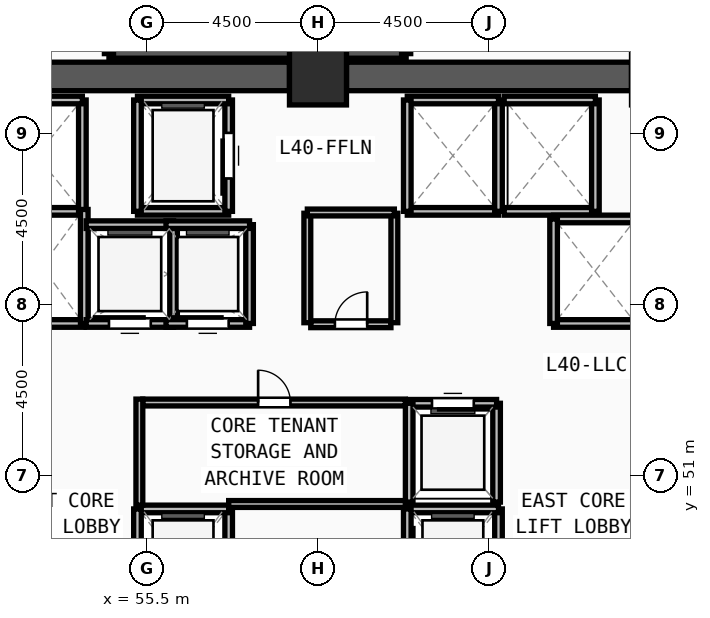
"""IFC4 building model, lengths in metres.
Left out: names, types, materials, properties, quantities, classifications, styles, units other than length and angle.
Written with IfcOpenShell. Run it as: python <this file> out.ifc"""

import sys

from ifc_helpers import new_model, si_unit, direction, frame, frame_2d, origin, origin_2d, place, context, subcontext, project, spatial, rectangle, extrude, source, transform, mapped, element, fill, save


model = new_model("IFC4")
c1 = context("Model", 3, precision=1e-05, world=origin(), true_north=direction((0.0, 1.0)))
c2 = subcontext(c1, "Body", "Model", "MODEL_VIEW")
j1 = project(units=[si_unit("LENGTHUNIT", "METRE"), si_unit("PLANEANGLEUNIT", "RADIAN")], contexts=[c1])
p1 = place(None, origin())
s1 = spatial("IfcSite", under=j1, at=p1, CompositionType="ELEMENT")
p2 = place(p1, origin())
s2 = spatial("IfcBuilding", under=s1, at=p2, CompositionType="ELEMENT")
p3 = place(p2, frame((0.0, 0.0, 155.25)))
s3 = spatial("IfcBuildingStorey", under=s2, at=p3, CompositionType="ELEMENT", Elevation=155.25)
m1 = source(origin(), c2, "Body", "SweptSolid", [
    extrude(rectangle(XDim=1.5, YDim=1.5, at=origin_2d()), origin(), (0.0, 0.0, 1.0), 3.75),
])
p4 = place(p3, frame((60.0, 61.5, 0.0), z_axis=(0.0, 0.0, 1.0), x_axis=(1.0, 0.0, 0.0)))
e1 = element("IfcColumn", 1, at=p4, inside=s3, PredefinedType="COLUMN", context=c2, shape_type="MappedRepresentation", body=[
    mapped(m1, transform((0.0, 0.0, 0.0), x_axis=(1.0, 0.0, 0.0), y_axis=(0.0, 1.0, 0.0), z_axis=(0.0, 0.0, 1.0), scale=1.0)),
])
for number, where, z_axis, x_axis in (
    (2, (51.75, 61.5, 0.0), (0.0, 0.0, 1.0), (1.0, 0.0, 0.0)),
    (3, (60.75, 61.5, 0.0), (0.0, 0.0, 1.0), (1.0, 0.0, 0.0)),
):
    element("IfcWall", number, at=place(p3, frame(where, z_axis=z_axis, x_axis=x_axis)), inside=s3, PredefinedType="SHEAR", context=c2, shape_type="SweptSolid", body=[
        extrude(rectangle(XDim=7.5, YDim=0.75, at=frame_2d((3.75, 0.0))), origin(), (0.0, 0.0, 1.0), 3.57),
    ])
p5 = place(p3, frame((54.5, 62.1, 0.0), z_axis=(0.0, 0.0, 1.0), x_axis=(1.0, 0.0, 0.0)))
e4 = element("IfcWall", 4, at=p5, inside=s3, PredefinedType="SOLIDWALL", context=c2, shape_type="SweptSolid", body=[
    extrude(rectangle(XDim=7.82, YDim=0.24, at=frame_2d((3.91, 0.0))), origin(), (0.0, 0.0, 1.0), 3.57),
])
for number, where, z_axis, x_axis in (
    (5, (62.32, 62.1, 0.0), (0.0, 0.0, 1.0), (0.0, 1.0, 0.0)),
    (6, (54.5, 65.54, 0.0), (0.0, 0.0, 1.0), (0.0, -1.0, 0.0)),
):
    element("IfcWall", number, at=place(p3, frame(where, z_axis=z_axis, x_axis=x_axis)), inside=s3, PredefinedType="SOLIDWALL", context=c2, shape_type="SweptSolid", body=[
        extrude(rectangle(XDim=3.44, YDim=0.24, at=frame_2d((1.72, 0.0))), origin(), (0.0, 0.0, 1.0), 3.57),
    ])
p6 = place(p3, frame((57.65, 47.12, 0.0), z_axis=(0.0, 0.0, 1.0), x_axis=(0.0, 1.0, 0.0)))
e7 = element("IfcWall", 7, at=p6, inside=s3, PredefinedType="SOLIDWALL", context=c2, shape_type="SweptSolid", body=[
    extrude(rectangle(XDim=3.0, YDim=0.2, at=frame_2d((1.5, 0.0))), origin(), (0.0, 0.0, 1.0), 3.57),
])
m2 = source(origin(), c2, "Body", "SweptSolid", [
    extrude(rectangle(XDim=1.2, YDim=2.3, at=frame_2d((0.6, 1.15))), frame((0.0, 0.11, 0.0), z_axis=(0.0, -1.0, 0.0), x_axis=(1.0, 0.0, 0.0)), (0.0, 0.0, 1.0), 0.22),
])
p7 = place(p6, frame((0.9, 0.0, 0.0)))
e8 = element("IfcOpeningElement", 8, at=p7, cuts=e7, PredefinedType="OPENING", context=c2, shape_type="MappedRepresentation", body=[
    mapped(m2, transform((0.0, 0.0, 0.0), x_axis=(1.0, 0.0, 0.0), y_axis=(0.0, 1.0, 0.0), z_axis=(0.0, 0.0, 1.0), scale=1.0)),
])
p8 = place(p3, frame((57.65, 50.12, 0.0), z_axis=(0.0, 0.0, 1.0), x_axis=(-1.0, 0.0, 0.0)))
e9 = element("IfcWall", 9, at=p8, inside=s3, PredefinedType="SOLIDWALL", context=c2, shape_type="SweptSolid", body=[
    extrude(rectangle(XDim=2.4, YDim=0.2, at=frame_2d((1.2, 0.0))), origin(), (0.0, 0.0, 1.0), 3.57),
])
for number, where, z_axis, x_axis in (
    (10, (55.25, 50.12, 0.0), (0.0, 0.0, 1.0), (0.0, -1.0, 0.0)),
    (11, (64.75, 47.12, 0.0), (0.0, 0.0, 1.0), (0.0, 1.0, 0.0)),
):
    element("IfcWall", number, at=place(p3, frame(where, z_axis=z_axis, x_axis=x_axis)), inside=s3, PredefinedType="SOLIDWALL", context=c2, shape_type="SweptSolid", body=[
        extrude(rectangle(XDim=3.0, YDim=0.2, at=frame_2d((1.5, 0.0))), origin(), (0.0, 0.0, 1.0), 3.57),
    ])
p9 = place(p3, frame((64.75, 50.12, 0.0), z_axis=(0.0, 0.0, 1.0), x_axis=(-1.0, 0.0, 0.0)))
e12 = element("IfcWall", 12, at=p9, inside=s3, PredefinedType="SOLIDWALL", context=c2, shape_type="SweptSolid", body=[
    extrude(rectangle(XDim=2.4, YDim=0.2, at=frame_2d((1.2, 0.0))), origin(), (0.0, 0.0, 1.0), 3.57),
])
p10 = place(p3, frame((62.35, 50.12, 0.0), z_axis=(0.0, 0.0, 1.0), x_axis=(0.0, -1.0, 0.0)))
e13 = element("IfcWall", 13, at=p10, inside=s3, PredefinedType="SOLIDWALL", context=c2, shape_type="SweptSolid", body=[
    extrude(rectangle(XDim=3.0, YDim=0.2, at=frame_2d((1.5, 0.0))), origin(), (0.0, 0.0, 1.0), 3.57),
])
p11 = place(p10, frame((0.9, 0.0, 0.0)))
e14 = element("IfcOpeningElement", 14, at=p11, cuts=e13, PredefinedType="OPENING", context=c2, shape_type="MappedRepresentation", body=[
    mapped(m2, transform((0.0, 0.0, 0.0), x_axis=(1.0, 0.0, 0.0), y_axis=(0.0, 1.0, 0.0), z_axis=(0.0, 0.0, 1.0), scale=1.0)),
])
p12 = place(p3, frame((55.25, 57.95, 0.0), z_axis=(0.0, 0.0, 1.0), x_axis=(1.0, 0.0, 0.0)))
e15 = element("IfcWall", 15, at=p12, inside=s3, PredefinedType="SOLIDWALL", context=c2, shape_type="SweptSolid", body=[
    extrude(rectangle(XDim=2.4, YDim=0.2, at=frame_2d((1.2, 0.0))), origin(), (0.0, 0.0, 1.0), 3.57),
])
p13 = place(p3, frame((57.65, 57.95, 0.0), z_axis=(0.0, 0.0, 1.0), x_axis=(0.0, 1.0, 0.0)))
e16 = element("IfcWall", 16, at=p13, inside=s3, PredefinedType="SOLIDWALL", context=c2, shape_type="SweptSolid", body=[
    extrude(rectangle(XDim=2.93, YDim=0.2, at=frame_2d((1.465, 0.0))), origin(), (0.0, 0.0, 1.0), 3.57),
])
p14 = place(p13, frame((0.865, 0.0, 0.0)))
e17 = element("IfcOpeningElement", 17, at=p14, cuts=e16, PredefinedType="OPENING", context=c2, shape_type="MappedRepresentation", body=[
    mapped(m2, transform((0.0, 0.0, 0.0), x_axis=(1.0, 0.0, 0.0), y_axis=(0.0, 1.0, 0.0), z_axis=(0.0, 0.0, 1.0), scale=1.0)),
])
p15 = place(p3, frame((57.65, 60.88, 0.0), z_axis=(0.0, 0.0, 1.0), x_axis=(-1.0, 0.0, 0.0)))
e18 = element("IfcWall", 18, at=p15, inside=s3, PredefinedType="SOLIDWALL", context=c2, shape_type="SweptSolid", body=[
    extrude(rectangle(XDim=2.4, YDim=0.2, at=frame_2d((1.2, 0.0))), origin(), (0.0, 0.0, 1.0), 3.57),
])
p16 = place(p3, frame((55.25, 60.88, 0.0), z_axis=(0.0, 0.0, 1.0), x_axis=(0.0, -1.0, 0.0)))
e19 = element("IfcWall", 19, at=p16, inside=s3, PredefinedType="SOLIDWALL", context=c2, shape_type="SweptSolid", body=[
    extrude(rectangle(XDim=2.93, YDim=0.2, at=frame_2d((1.465, 0.0))), origin(), (0.0, 0.0, 1.0), 3.57),
])
p17 = place(p3, frame((62.35, 57.95, 0.0), z_axis=(0.0, 0.0, 1.0), x_axis=(1.0, 0.0, 0.0)))
e20 = element("IfcWall", 20, at=p17, inside=s3, PredefinedType="SOLIDWALL", context=c2, shape_type="SweptSolid", body=[
    extrude(rectangle(XDim=2.4, YDim=0.2, at=frame_2d((1.2, 0.0))), origin(), (0.0, 0.0, 1.0), 3.57),
])
p18 = place(p3, frame((64.75, 57.95, 0.0), z_axis=(0.0, 0.0, 1.0), x_axis=(0.0, 1.0, 0.0)))
e21 = element("IfcWall", 21, at=p18, inside=s3, PredefinedType="SOLIDWALL", context=c2, shape_type="SweptSolid", body=[
    extrude(rectangle(XDim=2.93, YDim=0.2, at=frame_2d((1.465, 0.0))), origin(), (0.0, 0.0, 1.0), 3.57),
])
p19 = place(p3, frame((64.75, 60.88, 0.0), z_axis=(0.0, 0.0, 1.0), x_axis=(-1.0, 0.0, 0.0)))
e22 = element("IfcWall", 22, at=p19, inside=s3, PredefinedType="SOLIDWALL", context=c2, shape_type="SweptSolid", body=[
    extrude(rectangle(XDim=2.4, YDim=0.2, at=frame_2d((1.2, 0.0))), origin(), (0.0, 0.0, 1.0), 3.57),
])
p20 = place(p3, frame((62.35, 60.88, 0.0), z_axis=(0.0, 0.0, 1.0), x_axis=(0.0, -1.0, 0.0)))
e23 = element("IfcWall", 23, at=p20, inside=s3, PredefinedType="SOLIDWALL", context=c2, shape_type="SweptSolid", body=[
    extrude(rectangle(XDim=2.93, YDim=0.2, at=frame_2d((1.465, 0.0))), origin(), (0.0, 0.0, 1.0), 3.57),
])
p21 = place(p3, frame((64.9, 57.95, 0.0), z_axis=(0.0, 0.0, 1.0), x_axis=(1.0, 0.0, 0.0)))
e24 = element("IfcWall", 24, at=p21, inside=s3, PredefinedType="SOLIDWALL", context=c2, shape_type="SweptSolid", body=[
    extrude(rectangle(XDim=2.4, YDim=0.2, at=frame_2d((1.2, 0.0))), origin(), (0.0, 0.0, 1.0), 3.57),
])
p22 = place(p3, frame((67.3, 57.95, 0.0), z_axis=(0.0, 0.0, 1.0), x_axis=(0.0, 1.0, 0.0)))
e25 = element("IfcWall", 25, at=p22, inside=s3, PredefinedType="SOLIDWALL", context=c2, shape_type="SweptSolid", body=[
    extrude(rectangle(XDim=2.93, YDim=0.2, at=frame_2d((1.465, 0.0))), origin(), (0.0, 0.0, 1.0), 3.57),
])
for number, where, z_axis, x_axis in (
    (26, (67.3, 60.88, 0.0), (0.0, 0.0, 1.0), (-1.0, 0.0, 0.0)),
    (27, (51.4, 57.95, 0.0), (0.0, 0.0, 1.0), (1.0, 0.0, 0.0)),
):
    element("IfcWall", number, at=place(p3, frame(where, z_axis=z_axis, x_axis=x_axis)), inside=s3, PredefinedType="SOLIDWALL", context=c2, shape_type="SweptSolid", body=[
        extrude(rectangle(XDim=2.4, YDim=0.2, at=frame_2d((1.2, 0.0))), origin(), (0.0, 0.0, 1.0), 3.57),
    ])
p23 = place(p3, frame((53.8, 57.95, 0.0), z_axis=(0.0, 0.0, 1.0), x_axis=(0.0, 1.0, 0.0)))
e28 = element("IfcWall", 28, at=p23, inside=s3, PredefinedType="SOLIDWALL", context=c2, shape_type="SweptSolid", body=[
    extrude(rectangle(XDim=2.93, YDim=0.2, at=frame_2d((1.465, 0.0))), origin(), (0.0, 0.0, 1.0), 3.57),
])
p24 = place(p3, frame((53.8, 60.88, 0.0), z_axis=(0.0, 0.0, 1.0), x_axis=(-1.0, 0.0, 0.0)))
e29 = element("IfcWall", 29, at=p24, inside=s3, PredefinedType="SOLIDWALL", context=c2, shape_type="SweptSolid", body=[
    extrude(rectangle(XDim=2.4, YDim=0.2, at=frame_2d((1.2, 0.0))), origin(), (0.0, 0.0, 1.0), 3.57),
])
p25 = place(p3, frame((51.62, 55.0, 0.0), z_axis=(0.0, 0.0, 1.0), x_axis=(1.0, 0.0, 0.0)))
e30 = element("IfcWall", 30, at=p25, inside=s3, PredefinedType="SOLIDWALL", context=c2, shape_type="SweptSolid", body=[
    extrude(rectangle(XDim=2.23, YDim=0.2, at=frame_2d((1.115, 0.0))), origin(), (0.0, 0.0, 1.0), 3.57),
])
p26 = place(p3, frame((53.85, 55.0, 0.0), z_axis=(0.0, 0.0, 1.0), x_axis=(0.0, 1.0, 0.0)))
e31 = element("IfcWall", 31, at=p26, inside=s3, PredefinedType="SOLIDWALL", context=c2, shape_type="SweptSolid", body=[
    extrude(rectangle(XDim=3.0, YDim=0.2, at=frame_2d((1.5, 0.0))), origin(), (0.0, 0.0, 1.0), 3.57),
])
for number, where, z_axis, x_axis in (
    (32, (66.2, 55.0, 0.0), (0.0, 0.0, 1.0), (1.0, 0.0, 0.0)),
    (33, (68.38, 57.75, 0.0), (0.0, 0.0, 1.0), (-1.0, 0.0, 0.0)),
):
    element("IfcWall", number, at=place(p3, frame(where, z_axis=z_axis, x_axis=x_axis)), inside=s3, PredefinedType="SOLIDWALL", context=c2, shape_type="SweptSolid", body=[
        extrude(rectangle(XDim=2.18, YDim=0.2, at=frame_2d((1.09, 0.0))), origin(), (0.0, 0.0, 1.0), 3.57),
    ])
p27 = place(p3, frame((66.2, 57.75, 0.0), z_axis=(0.0, 0.0, 1.0), x_axis=(0.0, -1.0, 0.0)))
e34 = element("IfcWall", 34, at=p27, inside=s3, PredefinedType="SOLIDWALL", context=c2, shape_type="SweptSolid", body=[
    extrude(rectangle(XDim=2.75, YDim=0.2, at=frame_2d((1.375, 0.0))), origin(), (0.0, 0.0, 1.0), 3.57),
])
p28 = place(p3, frame((64.7, 50.3, 0.0), z_axis=(0.0, 0.0, 1.0), x_axis=(0.0, 1.0, 0.0)))
e35 = element("IfcWall", 35, at=p28, inside=s3, PredefinedType="SOLIDWALL", context=c2, shape_type="SweptSolid", body=[
    extrude(rectangle(XDim=2.6, YDim=0.2, at=frame_2d((1.3, 0.0))), origin(), (0.0, 0.0, 1.0), 3.57),
])
p29 = place(p3, frame((64.7, 52.9, 0.0), z_axis=(0.0, 0.0, 1.0), x_axis=(-1.0, 0.0, 0.0)))
e36 = element("IfcWall", 36, at=p29, inside=s3, PredefinedType="SOLIDWALL", context=c2, shape_type="SweptSolid", body=[
    extrude(rectangle(XDim=2.3, YDim=0.2, at=frame_2d((1.15, 0.0))), origin(), (0.0, 0.0, 1.0), 3.57),
])
m3 = source(origin(), c2, "Body", "SweptSolid", [
    extrude(rectangle(XDim=1.1, YDim=2.2, at=frame_2d((0.55, 1.1))), frame((0.0, 0.11, 0.0), z_axis=(0.0, -1.0, 0.0), x_axis=(1.0, 0.0, 0.0)), (0.0, 0.0, 1.0), 0.22),
])
p30 = place(p29, frame((0.6, 0.0, 0.0)))
e37 = element("IfcOpeningElement", 37, at=p30, cuts=e36, PredefinedType="OPENING", context=c2, shape_type="MappedRepresentation", body=[
    mapped(m3, transform((0.0, 0.0, 0.0), x_axis=(1.0, 0.0, 0.0), y_axis=(0.0, 1.0, 0.0), z_axis=(0.0, 0.0, 1.0), scale=1.0)),
])
p31 = place(p3, frame((62.4, 52.9, 0.0), z_axis=(0.0, 0.0, 1.0), x_axis=(0.0, -1.0, 0.0)))
e38 = element("IfcWall", 38, at=p31, inside=s3, PredefinedType="SOLIDWALL", context=c2, shape_type="SweptSolid", body=[
    extrude(rectangle(XDim=2.6, YDim=0.2, at=frame_2d((1.3, 0.0))), origin(), (0.0, 0.0, 1.0), 3.57),
])
p32 = place(p3, frame((53.9, 55.0, 0.0), z_axis=(0.0, 0.0, 1.0), x_axis=(1.0, 0.0, 0.0)))
e39 = element("IfcWall", 39, at=p32, inside=s3, PredefinedType="SOLIDWALL", context=c2, shape_type="SweptSolid", body=[
    extrude(rectangle(XDim=2.3, YDim=0.2, at=frame_2d((1.15, 0.0))), origin(), (0.0, 0.0, 1.0), 3.57),
])
p33 = place(p32, frame((0.6, 0.0, 0.0)))
e40 = element("IfcOpeningElement", 40, at=p33, cuts=e39, PredefinedType="OPENING", context=c2, shape_type="MappedRepresentation", body=[
    mapped(m3, transform((0.0, 0.0, 0.0), x_axis=(1.0, 0.0, 0.0), y_axis=(0.0, 1.0, 0.0), z_axis=(0.0, 0.0, 1.0), scale=1.0)),
])
p34 = place(p3, frame((56.2, 55.0, 0.0), z_axis=(0.0, 0.0, 1.0), x_axis=(0.0, 1.0, 0.0)))
e41 = element("IfcWall", 41, at=p34, inside=s3, PredefinedType="SOLIDWALL", context=c2, shape_type="SweptSolid", body=[
    extrude(rectangle(XDim=2.6, YDim=0.2, at=frame_2d((1.3, 0.0))), origin(), (0.0, 0.0, 1.0), 3.57),
])
p35 = place(p3, frame((56.2, 57.6, 0.0), z_axis=(0.0, 0.0, 1.0), x_axis=(-1.0, 0.0, 0.0)))
e42 = element("IfcWall", 42, at=p35, inside=s3, PredefinedType="SOLIDWALL", context=c2, shape_type="SweptSolid", body=[
    extrude(rectangle(XDim=2.3, YDim=0.2, at=frame_2d((1.15, 0.0))), origin(), (0.0, 0.0, 1.0), 3.57),
])
p36 = place(p3, frame((56.0, 55.0, 0.0), z_axis=(0.0, 0.0, 1.0), x_axis=(1.0, 0.0, 0.0)))
e43 = element("IfcWall", 43, at=p36, inside=s3, PredefinedType="SOLIDWALL", context=c2, shape_type="SweptSolid", body=[
    extrude(rectangle(XDim=2.2, YDim=0.2, at=frame_2d((1.1, 0.0))), origin(), (0.0, 0.0, 1.0), 3.57),
])
p37 = place(p36, frame((0.55, 0.0, 0.0)))
e44 = element("IfcOpeningElement", 44, at=p37, cuts=e43, PredefinedType="OPENING", context=c2, shape_type="MappedRepresentation", body=[
    mapped(m3, transform((0.0, 0.0, 0.0), x_axis=(1.0, 0.0, 0.0), y_axis=(0.0, 1.0, 0.0), z_axis=(0.0, 0.0, 1.0), scale=1.0)),
])
p38 = place(p3, frame((58.2, 55.0, 0.0), z_axis=(0.0, 0.0, 1.0), x_axis=(0.0, 1.0, 0.0)))
e45 = element("IfcWall", 45, at=p38, inside=s3, PredefinedType="SOLIDWALL", context=c2, shape_type="SweptSolid", body=[
    extrude(rectangle(XDim=2.6, YDim=0.2, at=frame_2d((1.3, 0.0))), origin(), (0.0, 0.0, 1.0), 3.57),
])
p39 = place(p3, frame((58.2, 57.6, 0.0), z_axis=(0.0, 0.0, 1.0), x_axis=(-1.0, 0.0, 0.0)))
e46 = element("IfcWall", 46, at=p39, inside=s3, PredefinedType="SOLIDWALL", context=c2, shape_type="SweptSolid", body=[
    extrude(rectangle(XDim=2.2, YDim=0.2, at=frame_2d((1.1, 0.0))), origin(), (0.0, 0.0, 1.0), 3.57),
])
p40 = place(p3, frame((55.39, 52.92, 0.0), z_axis=(0.0, 0.0, 1.0), x_axis=(1.0, 0.0, 0.0)))
e47 = element("IfcWall", 47, at=p40, inside=s3, PredefinedType="PARTITIONING", context=c2, shape_type="SweptSolid", body=[
    extrude(rectangle(XDim=6.91, YDim=0.18, at=frame_2d((3.455, 0.0))), origin(), (0.0, 0.0, 1.0), 3.57),
])
m4 = source(origin(), c2, "Body", "SweptSolid", [
    extrude(rectangle(XDim=0.85, YDim=2.1, at=frame_2d((0.425, 1.05))), frame((0.0, 0.1, 0.0), z_axis=(0.0, -1.0, 0.0), x_axis=(1.0, 0.0, 0.0)), (0.0, 0.0, 1.0), 0.2),
])
p41 = place(p40, frame((3.035, 0.0, 0.0)))
e48 = element("IfcOpeningElement", 48, at=p41, cuts=e47, PredefinedType="OPENING", context=c2, shape_type="MappedRepresentation", body=[
    mapped(m4, transform((0.0, 0.0, 0.0), x_axis=(1.0, 0.0, 0.0), y_axis=(0.0, 1.0, 0.0), z_axis=(0.0, 0.0, 1.0), scale=1.0)),
])
p42 = place(p3, frame((59.81, 54.98, 0.0), z_axis=(0.0, 0.0, 1.0), x_axis=(1.0, 0.0, 0.0)))
e49 = element("IfcWall", 49, at=p42, inside=s3, PredefinedType="PARTITIONING", context=c2, shape_type="SweptSolid", body=[
    extrude(rectangle(XDim=2.11, YDim=0.18, at=frame_2d((1.055, 0.0))), origin(), (0.0, 0.0, 1.0), 3.57),
])
p43 = place(p42, frame((0.635, 0.0, 0.0)))
e50 = element("IfcOpeningElement", 50, at=p43, cuts=e49, PredefinedType="OPENING", context=c2, shape_type="MappedRepresentation", body=[
    mapped(m4, transform((0.0, 0.0, 0.0), x_axis=(1.0, 0.0, 0.0), y_axis=(0.0, 1.0, 0.0), z_axis=(0.0, 0.0, 1.0), scale=1.0)),
])
for number, where, z_axis, x_axis in (
    (51, (59.72, 55.02, 0.0), (0.0, 0.0, 1.0), (0.0, 1.0, 0.0)),
    (52, (62.01, 55.02, 0.0), (0.0, 0.0, 1.0), (0.0, 1.0, 0.0)),
):
    element("IfcWall", number, at=place(p3, frame(where, z_axis=z_axis, x_axis=x_axis)), inside=s3, PredefinedType="PARTITIONING", context=c2, shape_type="SweptSolid", body=[
        extrude(rectangle(XDim=2.88, YDim=0.18, at=frame_2d((1.44, 0.0))), origin(), (0.0, 0.0, 1.0), 3.57),
    ])
p44 = place(p3, frame((59.72, 57.92, 0.0), z_axis=(0.0, 0.0, 1.0), x_axis=(1.0, 0.0, 0.0)))
e53 = element("IfcWall", 53, at=p44, inside=s3, PredefinedType="PARTITIONING", context=c2, shape_type="SweptSolid", body=[
    extrude(rectangle(XDim=2.29, YDim=0.18, at=frame_2d((1.145, 0.0))), origin(), (0.0, 0.0, 1.0), 3.57),
])
p45 = place(p3, frame((55.3, 50.22, 0.0), z_axis=(0.0, 0.0, 1.0), x_axis=(0.0, 1.0, 0.0)))
e54 = element("IfcWall", 54, at=p45, inside=s3, PredefinedType="PARTITIONING", context=c2, shape_type="SweptSolid", body=[
    extrude(rectangle(XDim=2.79, YDim=0.18, at=frame_2d((1.395, 0.0))), origin(), (0.0, 0.0, 1.0), 3.57),
])
p46 = place(p3, frame((57.65, 50.25, 0.0), z_axis=(0.0, 0.0, 1.0), x_axis=(1.0, 0.0, 0.0)))
e55 = element("IfcWall", 55, at=p46, inside=s3, PredefinedType="PARTITIONING", context=c2, shape_type="SweptSolid", body=[
    extrude(rectangle(XDim=4.65, YDim=0.18, at=frame_2d((2.325, 0.0))), origin(), (0.0, 0.0, 1.0), 3.57),
])
m5 = source(origin(), c2, "Body", "SweptSolid", [
    extrude(rectangle(XDim=1.2, YDim=2.3, at=frame_2d((0.6, 1.15))), frame((0.0, 0.025, 0.0), z_axis=(0.0, -1.0, 0.0), x_axis=(1.0, 0.0, 0.0)), (0.0, 0.0, 1.0), 0.05),
])
p47 = place(p14, origin())
e56 = element("IfcDoor", 56, at=p47, inside=s3, OperationType="SLIDING_TO_LEFT", PredefinedType="DOOR", context=c2, shape_type="MappedRepresentation", body=[
    mapped(m5, transform((0.0, 0.0, 0.0), x_axis=(1.0, 0.0, 0.0), y_axis=(0.0, 1.0, 0.0), z_axis=(0.0, 0.0, 1.0), scale=1.0)),
])
fill(e17, e56)
m6 = source(origin(), c2, "Body", "SweptSolid", [
    extrude(rectangle(XDim=1.1, YDim=2.2, at=frame_2d((0.55, 1.1))), frame((0.0, 0.025, 0.0), z_axis=(0.0, -1.0, 0.0), x_axis=(1.0, 0.0, 0.0)), (0.0, 0.0, 1.0), 0.05),
])
p48 = place(p30, origin())
e57 = element("IfcDoor", 57, at=p48, inside=s3, OperationType="SLIDING_TO_LEFT", PredefinedType="DOOR", context=c2, shape_type="MappedRepresentation", body=[
    mapped(m6, transform((0.0, 0.0, 0.0), x_axis=(1.0, 0.0, 0.0), y_axis=(0.0, 1.0, 0.0), z_axis=(0.0, 0.0, 1.0), scale=1.0)),
])
fill(e37, e57)
p49 = place(p33, origin())
e58 = element("IfcDoor", 58, at=p49, inside=s3, OperationType="SLIDING_TO_LEFT", PredefinedType="DOOR", context=c2, shape_type="MappedRepresentation", body=[
    mapped(m6, transform((0.0, 0.0, 0.0), x_axis=(1.0, 0.0, 0.0), y_axis=(0.0, 1.0, 0.0), z_axis=(0.0, 0.0, 1.0), scale=1.0)),
])
fill(e40, e58)
p50 = place(p37, origin())
e59 = element("IfcDoor", 59, at=p50, inside=s3, OperationType="SLIDING_TO_LEFT", PredefinedType="DOOR", context=c2, shape_type="MappedRepresentation", body=[
    mapped(m6, transform((0.0, 0.0, 0.0), x_axis=(1.0, 0.0, 0.0), y_axis=(0.0, 1.0, 0.0), z_axis=(0.0, 0.0, 1.0), scale=1.0)),
])
fill(e44, e59)
m7 = source(origin(), c2, "Body", "SweptSolid", [
    extrude(rectangle(XDim=0.85, YDim=2.1, at=frame_2d((0.425, 1.05))), frame((0.0, 0.025, 0.0), z_axis=(0.0, -1.0, 0.0), x_axis=(1.0, 0.0, 0.0)), (0.0, 0.0, 1.0), 0.05),
])
p51 = place(p41, origin())
e60 = element("IfcDoor", 60, at=p51, inside=s3, OperationType="SINGLE_SWING_LEFT", PredefinedType="DOOR", context=c2, shape_type="MappedRepresentation", body=[
    mapped(m7, transform((0.0, 0.0, 0.0), x_axis=(1.0, 0.0, 0.0), y_axis=(0.0, 1.0, 0.0), z_axis=(0.0, 0.0, 1.0), scale=1.0)),
])
fill(e48, e60)
p52 = place(p43, origin())
e61 = element("IfcDoor", 61, at=p52, inside=s3, OperationType="SINGLE_SWING_RIGHT", PredefinedType="DOOR", context=c2, shape_type="MappedRepresentation", body=[
    mapped(m7, transform((0.0, 0.0, 0.0), x_axis=(1.0, 0.0, 0.0), y_axis=(0.0, 1.0, 0.0), z_axis=(0.0, 0.0, 1.0), scale=1.0)),
])
fill(e50, e61)
save(model, sys.argv[1])
